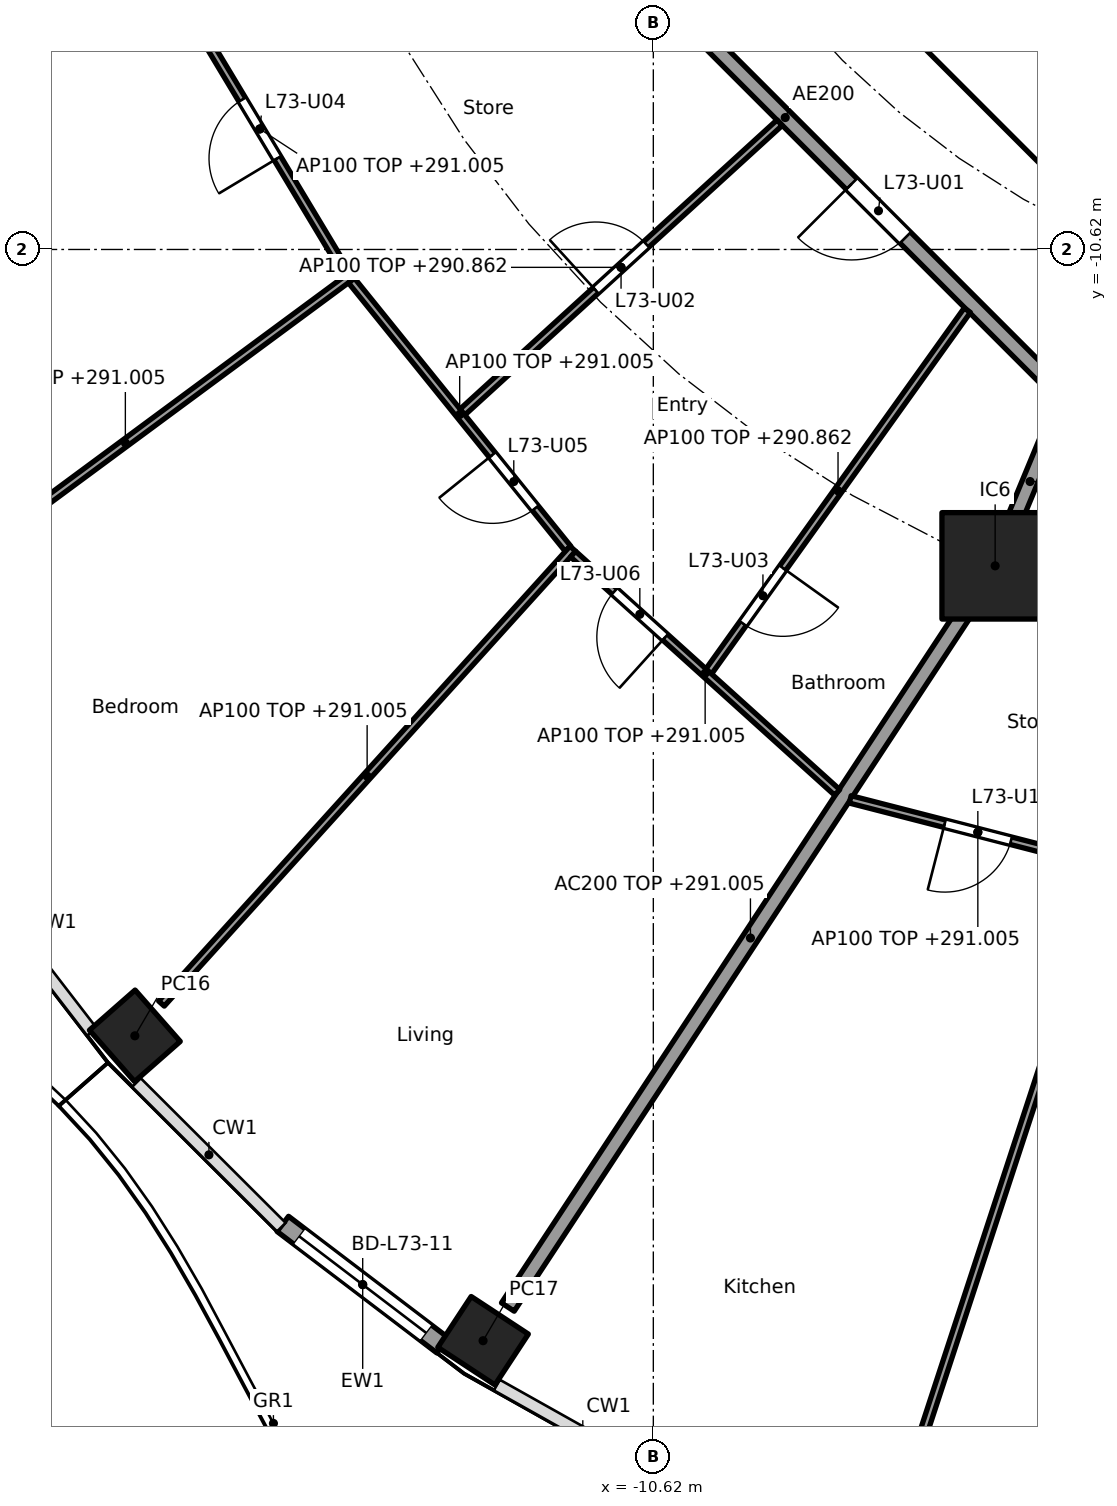
"""IFC4 building model, lengths in metres.
Left out: names, types, materials, properties, quantities, classifications, styles, units other than length and angle.
Written with IfcOpenShell. Run it as: python <this file> out.ifc"""

import sys

from ifc_helpers import new_model, si_unit, direction, frame, frame_2d, origin, origin_2d, place, context, subcontext, project, spatial, rectangle, hollow_rectangle, extrude, element, fill, save


model = new_model("IFC4")
c1 = context("Model", 3, precision=1e-05, world=origin(), true_north=direction((0.0, 1.0)))
c2 = subcontext(c1, "Body", "Model", "MODEL_VIEW")
j1 = project(units=[si_unit("LENGTHUNIT", "METRE"), si_unit("PLANEANGLEUNIT", "RADIAN")], contexts=[c1])
p1 = place(None, origin())
s1 = spatial("IfcSite", under=j1, at=p1, CompositionType="ELEMENT")
p2 = place(p1, origin())
s2 = spatial("IfcBuilding", under=s1, at=p2, CompositionType="ELEMENT")
p3 = place(p2, frame((0.0, 0.0, 288.1)))
s3 = spatial("IfcBuildingStorey", under=s2, at=p3, CompositionType="ELEMENT", Elevation=288.1)
for number, where, z_axis, x_axis in (
    (1, (-17.441, -20.965, 0.0), (0.0, 0.0, 1.0), (0.66, -0.751, 0.0)),
    (2, (-12.86, -24.976, 0.0), (0.0, 0.0, 1.0), (0.836, -0.549, 0.0)),
):
    element("IfcColumn", number, at=place(p3, frame(where, z_axis=z_axis, x_axis=x_axis)), inside=s3, PredefinedType="COLUMN", context=c2, shape_type="SweptSolid", body=[
        extrude(hollow_rectangle(XDim=0.9, YDim=0.8, WallThickness=0.028, at=origin_2d()), origin(), (0.0, 0.0, 1.0), 3.7),
    ])
p4 = place(p3, frame((-6.123, -14.782, 0.0), z_axis=(0.0, 0.0, 1.0), x_axis=(1.0, 0.0, 0.0)))
e3 = element("IfcColumn", 3, at=p4, inside=s3, PredefinedType="COLUMN", context=c2, shape_type="SweptSolid", body=[
    extrude(rectangle(XDim=1.4, YDim=1.4, at=origin_2d()), origin(), (0.0, 0.0, 1.0), 3.7),
])
p5 = place(p3, frame((-13.393, -25.037, 0.0), z_axis=(0.0, 0.0, 1.0), x_axis=(-0.796055284084, 0.605223912847, 0.0)))
e4 = element("IfcWall", 4, at=p5, inside=s3, PredefinedType="SOLIDWALL", context=c2, shape_type="SweptSolid", body=[
    extrude(rectangle(XDim=2.641, YDim=0.25, at=frame_2d((1.32, 0.0))), origin(), (0.0, 0.0, 1.0), 3.44),
])
p6 = place(p5, frame((0.27, 0.0, 0.0)))
e5 = element("IfcOpeningElement", 5, at=p6, cuts=e4, PredefinedType="OPENING", context=c2, shape_type="SweptSolid", body=[
    extrude(rectangle(XDim=2.1, YDim=2.4, at=frame_2d((1.05, 1.2))), frame((0.0, 0.135, 0.0), z_axis=(0.0, -1.0, 0.0), x_axis=(1.0, 0.0, 0.0)), (0.0, 0.0, 1.0), 0.27),
])
p7 = place(p3, frame((-9.988, -4.613, 0.0), z_axis=(0.0, 0.0, 1.0), x_axis=(0.707106781187, -0.707106781187, 0.0)))
e6 = element("IfcWall", 6, at=p7, inside=s3, PredefinedType="SHEAR", context=c2, shape_type="SweptSolid", body=[
    extrude(rectangle(XDim=7.602, YDim=0.6, at=frame_2d((3.801, 0.0))), origin(), (0.0, 0.0, 1.0), 3.44),
])
p8 = place(p7, frame((6.151, 0.0, 0.0)))
e7 = element("IfcOpeningElement", 7, at=p8, cuts=e6, PredefinedType="OPENING", context=c2, shape_type="SweptSolid", body=[
    extrude(rectangle(XDim=1.1, YDim=2.1, at=frame_2d((0.55, 1.05))), frame((0.0, 0.31, 0.0), z_axis=(0.0, -1.0, 0.0), x_axis=(1.0, 0.0, 0.0)), (0.0, 0.0, 1.0), 0.62),
])
p9 = place(p3, frame((-5.8, -8.227, 0.0), z_axis=(0.0, 0.0, 1.0), x_axis=(0.0, 1.0, 0.0)))
e8 = element("IfcWall", 8, at=p9, inside=s3, PredefinedType="PARTITIONING", context=c2, shape_type="SweptSolid", body=[
    extrude(rectangle(XDim=3.927, YDim=0.15, at=frame_2d((1.963, 0.0))), origin(), (0.0, 0.0, 1.0), 3.44),
])
p10 = place(p9, frame((1.476, 0.0, 0.0)))
e9 = element("IfcOpeningElement", 9, at=p10, cuts=e8, PredefinedType="OPENING", context=c2, shape_type="SweptSolid", body=[
    extrude(rectangle(XDim=0.9, YDim=2.1, at=frame_2d((0.45, 1.05))), frame((0.0, 0.085, 0.0), z_axis=(0.0, -1.0, 0.0), x_axis=(1.0, 0.0, 0.0)), (0.0, 0.0, 1.0), 0.17),
])
p11 = place(p3, frame((-14.828, -6.142, 0.0), z_axis=(0.0, 0.0, 1.0), x_axis=(-0.924478087429, -0.381235184451, 0.0)))
e10 = element("IfcWall", 10, at=p11, inside=s3, PredefinedType="PARTITIONING", context=c2, shape_type="SweptSolid", body=[
    extrude(rectangle(XDim=8.499, YDim=0.2, at=frame_2d((4.25, 0.0))), origin(), (0.0, 0.0, 1.0), 2.905),
])
p12 = place(p3, frame((-5.243, -12.657, 0.0), z_axis=(0.0, 0.0, 1.0), x_axis=(-0.382770106157, -0.923843626288, 0.0)))
e11 = element("IfcWall", 11, at=p12, inside=s3, PredefinedType="PARTITIONING", context=c2, shape_type="SweptSolid", body=[
    extrude(rectangle(XDim=2.199, YDim=0.2, at=frame_2d((1.1, 0.0))), origin(), (0.0, 0.0, 1.0), 3.44),
])
p13 = place(p3, frame((-6.151, -14.824, 0.0), z_axis=(0.0, 0.0, 1.0), x_axis=(-0.549345577828, -0.835595258556, 0.0)))
e12 = element("IfcWall", 12, at=p13, inside=s3, PredefinedType="PARTITIONING", context=c2, shape_type="SweptSolid", body=[
    extrude(rectangle(XDim=11.62, YDim=0.2, at=frame_2d((5.81, 0.0))), origin(), (0.0, 0.0, 1.0), 2.905),
])
p14 = place(p3, frame((-12.635, -5.134, 0.0), z_axis=(0.0, 0.0, 1.0), x_axis=(0.707106781187, -0.707106781187, 0.0)))
e13 = element("IfcWall", 13, at=p14, inside=s3, PredefinedType="PARTITIONING", context=c2, shape_type="SweptSolid", body=[
    extrude(rectangle(XDim=10.609, YDim=0.2, at=frame_2d((5.305, 0.0))), origin(), (0.0, 0.0, 1.0), 3.44),
])
p15 = place(p14, frame((6.539, 0.0, 0.0)))
e14 = element("IfcOpeningElement", 14, at=p15, cuts=e13, PredefinedType="OPENING", context=c2, shape_type="SweptSolid", body=[
    extrude(rectangle(XDim=1.0, YDim=2.1, at=frame_2d((0.5, 1.05))), frame((0.0, 0.11, 0.0), z_axis=(0.0, -1.0, 0.0), x_axis=(1.0, 0.0, 0.0)), (0.0, 0.0, 1.0), 0.22),
])
p16 = place(p3, frame((-16.946, -7.122, 0.0), z_axis=(0.0, 0.0, 1.0), x_axis=(0.514994556856, -0.857193447483, 0.0)))
e15 = element("IfcWall", 15, at=p16, inside=s3, PredefinedType="PARTITIONING", context=c2, shape_type="SweptSolid", body=[
    extrude(rectangle(XDim=4.462, YDim=0.1, at=frame_2d((2.231, 0.0))), origin(), (0.0, 0.0, 1.0), 2.905),
])
p17 = place(p16, frame((1.781, 0.0, 0.0)))
e16 = element("IfcOpeningElement", 16, at=p17, cuts=e15, PredefinedType="OPENING", context=c2, shape_type="SweptSolid", body=[
    extrude(rectangle(XDim=0.9, YDim=2.1, at=frame_2d((0.45, 1.05))), frame((0.0, 0.06, 0.0), z_axis=(0.0, -1.0, 0.0), x_axis=(1.0, 0.0, 0.0)), (0.0, 0.0, 1.0), 0.12),
])
p18 = place(p3, frame((-14.582, -10.96, 0.0), z_axis=(0.0, 0.0, 1.0), x_axis=(-0.804405200554, -0.594081032623, 0.0)))
e17 = element("IfcWall", 17, at=p18, inside=s3, PredefinedType="PARTITIONING", context=c2, shape_type="SweptSolid", body=[
    extrude(rectangle(XDim=7.418, YDim=0.1, at=frame_2d((3.709, 0.0))), origin(), (0.0, 0.0, 1.0), 2.905),
])
p19 = place(p3, frame((-14.591, -11.029, 0.0), z_axis=(0.0, 0.0, 1.0), x_axis=(0.628170338674, -0.778075848237, 0.0)))
e18 = element("IfcWall", 18, at=p19, inside=s3, PredefinedType="PARTITIONING", context=c2, shape_type="SweptSolid", body=[
    extrude(rectangle(XDim=4.532, YDim=0.1, at=frame_2d((2.266, 0.0))), origin(), (0.0, 0.0, 1.0), 2.905),
])
p20 = place(p19, frame((2.949, 0.0, 0.0)))
e19 = element("IfcOpeningElement", 19, at=p20, cuts=e18, PredefinedType="OPENING", context=c2, shape_type="SweptSolid", body=[
    extrude(rectangle(XDim=0.9, YDim=2.1, at=frame_2d((0.45, 1.05))), frame((0.0, 0.06, 0.0), z_axis=(0.0, -1.0, 0.0), x_axis=(1.0, 0.0, 0.0)), (0.0, 0.0, 1.0), 0.12),
])
p21 = place(p3, frame((-8.958, -8.952, 0.0), z_axis=(0.0, 0.0, 1.0), x_axis=(-0.73876526954, -0.673962815385, 0.0)))
e20 = element("IfcWall", 20, at=p21, inside=s3, PredefinedType="PARTITIONING", context=c2, shape_type="SweptSolid", body=[
    extrude(rectangle(XDim=5.647, YDim=0.1, at=frame_2d((2.824, 0.0))), origin(), (0.0, 0.0, 1.0), 2.762),
])
p22 = place(p21, frame((2.374, 0.0, 0.0)))
e21 = element("IfcOpeningElement", 21, at=p22, cuts=e20, PredefinedType="OPENING", context=c2, shape_type="SweptSolid", body=[
    extrude(rectangle(XDim=0.9, YDim=2.1, at=frame_2d((0.45, 1.05))), frame((0.0, 0.06, 0.0), z_axis=(0.0, -1.0, 0.0), x_axis=(1.0, 0.0, 0.0)), (0.0, 0.0, 1.0), 0.12),
])
p23 = place(p3, frame((-11.679, -14.557, 0.0), z_axis=(0.0, 0.0, 1.0), x_axis=(-0.670800011545, -0.741638284146, 0.0)))
e22 = element("IfcWall", 22, at=p23, inside=s3, PredefinedType="PARTITIONING", context=c2, shape_type="SweptSolid", body=[
    extrude(rectangle(XDim=8.068, YDim=0.1, at=frame_2d((4.034, 0.0))), origin(), (0.0, 0.0, 1.0), 2.905),
])
p24 = place(p3, frame((-11.676, -14.628, 0.0), z_axis=(0.0, 0.0, 1.0), x_axis=(0.74245829867, -0.669892285921, 0.0)))
e23 = element("IfcWall", 23, at=p24, inside=s3, PredefinedType="PARTITIONING", context=c2, shape_type="SweptSolid", body=[
    extrude(rectangle(XDim=4.68, YDim=0.1, at=frame_2d((2.34, 0.0))), origin(), (0.0, 0.0, 1.0), 2.905),
])
p25 = place(p24, frame((0.732, 0.0, 0.0)))
e24 = element("IfcOpeningElement", 24, at=p25, cuts=e23, PredefinedType="OPENING", context=c2, shape_type="SweptSolid", body=[
    extrude(rectangle(XDim=0.9, YDim=2.1, at=frame_2d((0.45, 1.05))), frame((0.0, 0.06, 0.0), z_axis=(0.0, -1.0, 0.0), x_axis=(1.0, 0.0, 0.0)), (0.0, 0.0, 1.0), 0.12),
])
p26 = place(p3, frame((-6.49, -11.419, 0.0), z_axis=(0.0, 0.0, 1.0), x_axis=(-0.58201647594, -0.813176992871, 0.0)))
e25 = element("IfcWall", 25, at=p26, inside=s3, PredefinedType="PARTITIONING", context=c2, shape_type="SweptSolid", body=[
    extrude(rectangle(XDim=5.844, YDim=0.1, at=frame_2d((2.922, 0.0))), origin(), (0.0, 0.0, 1.0), 2.762),
])
p27 = place(p26, frame((4.169, 0.0, 0.0)))
e26 = element("IfcOpeningElement", 26, at=p27, cuts=e25, PredefinedType="OPENING", context=c2, shape_type="SweptSolid", body=[
    extrude(rectangle(XDim=0.9, YDim=2.1, at=frame_2d((0.45, 1.05))), frame((0.0, 0.06, 0.0), z_axis=(0.0, -1.0, 0.0), x_axis=(1.0, 0.0, 0.0)), (0.0, 0.0, 1.0), 0.12),
])
p28 = place(p3, frame((-8.03, -17.854, 0.0), z_axis=(0.0, 0.0, 1.0), x_axis=(0.968441967324, -0.249239154077, 0.0)))
e27 = element("IfcWall", 27, at=p28, inside=s3, PredefinedType="PARTITIONING", context=c2, shape_type="SweptSolid", body=[
    extrude(rectangle(XDim=3.468, YDim=0.1, at=frame_2d((1.734, 0.0))), origin(), (0.0, 0.0, 1.0), 2.905),
])
p29 = place(p28, frame((1.284, 0.0, 0.0)))
e28 = element("IfcOpeningElement", 28, at=p29, cuts=e27, PredefinedType="OPENING", context=c2, shape_type="SweptSolid", body=[
    extrude(rectangle(XDim=0.9, YDim=2.1, at=frame_2d((0.45, 1.05))), frame((0.0, 0.06, 0.0), z_axis=(0.0, -1.0, 0.0), x_axis=(1.0, 0.0, 0.0)), (0.0, 0.0, 1.0), 0.12),
])
p30 = place(p3, frame((-2.633, -12.66, 0.0), z_axis=(0.0, 0.0, 1.0), x_axis=(-0.311432955908, -0.950268127412, 0.0)))
e29 = element("IfcWall", 29, at=p30, inside=s3, PredefinedType="PARTITIONING", context=c2, shape_type="SweptSolid", body=[
    extrude(rectangle(XDim=15.074, YDim=0.1, at=frame_2d((7.537, 0.0))), origin(), (0.0, 0.0, 1.0), 2.762),
])
p31 = place(p30, frame((0.829, 0.0, 0.0)))
e30 = element("IfcOpeningElement", 30, at=p31, cuts=e29, PredefinedType="OPENING", context=c2, shape_type="SweptSolid", body=[
    extrude(rectangle(XDim=0.9, YDim=2.1, at=frame_2d((0.45, 1.05))), frame((0.0, 0.06, 0.0), z_axis=(0.0, -1.0, 0.0), x_axis=(1.0, 0.0, 0.0)), (0.0, 0.0, 1.0), 0.12),
])
p32 = place(p6, origin())
e31 = element("IfcDoor", 31, at=p32, inside=s3, OperationType="SLIDING_TO_LEFT", PredefinedType="DOOR", context=c2, shape_type="SweptSolid", body=[
    extrude(rectangle(XDim=2.1, YDim=2.4, at=frame_2d((1.05, 1.2))), frame((0.0, 0.025, 0.0), z_axis=(0.0, -1.0, 0.0), x_axis=(1.0, 0.0, 0.0)), (0.0, 0.0, 1.0), 0.05),
])
fill(e5, e31)
p33 = place(p8, origin())
e32 = element("IfcDoor", 32, at=p33, inside=s3, OperationType="SINGLE_SWING_LEFT", PredefinedType="DOOR", context=c2, shape_type="SweptSolid", body=[
    extrude(rectangle(XDim=1.1, YDim=2.1, at=frame_2d((0.55, 1.05))), frame((0.0, 0.025, 0.0), z_axis=(0.0, -1.0, 0.0), x_axis=(1.0, 0.0, 0.0)), (0.0, 0.0, 1.0), 0.05),
])
fill(e7, e32)
p34 = place(p15, frame((1.0, 0.0, 0.0), x_axis=(-1.0, 0.0, 0.0)))
e33 = element("IfcDoor", 33, at=p34, inside=s3, OperationType="SINGLE_SWING_RIGHT", PredefinedType="DOOR", context=c2, shape_type="SweptSolid", body=[
    extrude(rectangle(XDim=1.0, YDim=2.1, at=frame_2d((0.5, 1.05))), frame((0.0, 0.025, 0.0), z_axis=(0.0, -1.0, 0.0), x_axis=(1.0, 0.0, 0.0)), (0.0, 0.0, 1.0), 0.05),
])
fill(e14, e33)
p35 = place(p22, frame((0.9, 0.0, 0.0), x_axis=(-1.0, 0.0, 0.0)))
e34 = element("IfcDoor", 34, at=p35, inside=s3, OperationType="SINGLE_SWING_LEFT", PredefinedType="DOOR", context=c2, shape_type="SweptSolid", body=[
    extrude(rectangle(XDim=0.9, YDim=2.1, at=frame_2d((0.45, 1.05))), frame((0.0, 0.025, 0.0), z_axis=(0.0, -1.0, 0.0), x_axis=(1.0, 0.0, 0.0)), (0.0, 0.0, 1.0), 0.05),
])
fill(e21, e34)
p36 = place(p27, origin())
e35 = element("IfcDoor", 35, at=p36, inside=s3, OperationType="SINGLE_SWING_LEFT", PredefinedType="DOOR", context=c2, shape_type="SweptSolid", body=[
    extrude(rectangle(XDim=0.9, YDim=2.1, at=frame_2d((0.45, 1.05))), frame((0.0, 0.025, 0.0), z_axis=(0.0, -1.0, 0.0), x_axis=(1.0, 0.0, 0.0)), (0.0, 0.0, 1.0), 0.05),
])
fill(e26, e35)
p37 = place(p17, frame((0.9, 0.0, 0.0), x_axis=(-1.0, 0.0, 0.0)))
e36 = element("IfcDoor", 36, at=p37, inside=s3, OperationType="SINGLE_SWING_LEFT", PredefinedType="DOOR", context=c2, shape_type="SweptSolid", body=[
    extrude(rectangle(XDim=0.9, YDim=2.1, at=frame_2d((0.45, 1.05))), frame((0.0, 0.025, 0.0), z_axis=(0.0, -1.0, 0.0), x_axis=(1.0, 0.0, 0.0)), (0.0, 0.0, 1.0), 0.05),
])
fill(e16, e36)
p38 = place(p20, frame((0.9, 0.0, 0.0), x_axis=(-1.0, 0.0, 0.0)))
e37 = element("IfcDoor", 37, at=p38, inside=s3, OperationType="SINGLE_SWING_RIGHT", PredefinedType="DOOR", context=c2, shape_type="SweptSolid", body=[
    extrude(rectangle(XDim=0.9, YDim=2.1, at=frame_2d((0.45, 1.05))), frame((0.0, 0.025, 0.0), z_axis=(0.0, -1.0, 0.0), x_axis=(1.0, 0.0, 0.0)), (0.0, 0.0, 1.0), 0.05),
])
fill(e19, e37)
p39 = place(p25, frame((0.9, 0.0, 0.0), x_axis=(-1.0, 0.0, 0.0)))
e38 = element("IfcDoor", 38, at=p39, inside=s3, OperationType="SINGLE_SWING_LEFT", PredefinedType="DOOR", context=c2, shape_type="SweptSolid", body=[
    extrude(rectangle(XDim=0.9, YDim=2.1, at=frame_2d((0.45, 1.05))), frame((0.0, 0.025, 0.0), z_axis=(0.0, -1.0, 0.0), x_axis=(1.0, 0.0, 0.0)), (0.0, 0.0, 1.0), 0.05),
])
fill(e24, e38)
p40 = place(p29, frame((0.9, 0.0, 0.0), x_axis=(-1.0, 0.0, 0.0)))
e39 = element("IfcDoor", 39, at=p40, inside=s3, OperationType="SINGLE_SWING_RIGHT", PredefinedType="DOOR", context=c2, shape_type="SweptSolid", body=[
    extrude(rectangle(XDim=0.9, YDim=2.1, at=frame_2d((0.45, 1.05))), frame((0.0, 0.025, 0.0), z_axis=(0.0, -1.0, 0.0), x_axis=(1.0, 0.0, 0.0)), (0.0, 0.0, 1.0), 0.05),
])
fill(e28, e39)
save(model, sys.argv[1])
